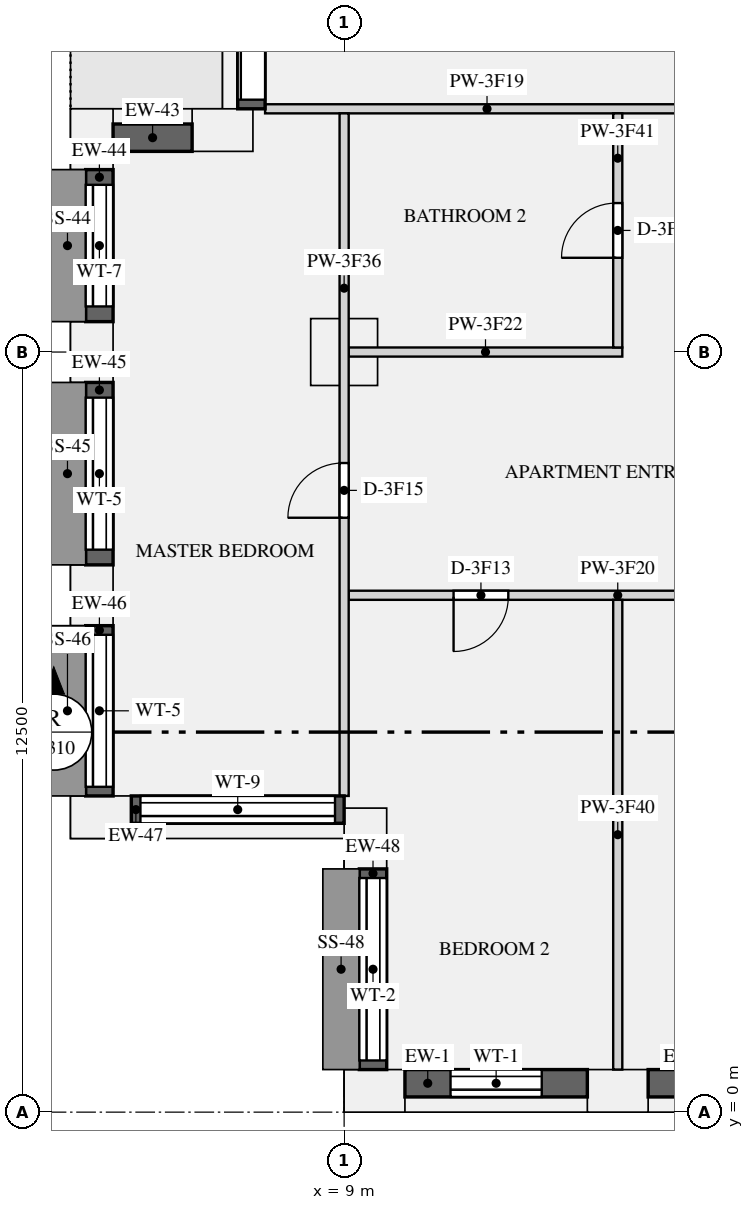
"""IFC4 building model, lengths in metres.
Left out: names, types, materials, properties, quantities, classifications, styles, units other than length and angle.
Written with IfcOpenShell. Run it as: python <this file> out.ifc"""

import sys

from ifc_helpers import new_model, si_unit, direction, frame, frame_2d, origin, origin_2d, place, context, subcontext, project, spatial, rectangle, extrude, element, fill, save


model = new_model("IFC4")
c1 = context("Model", 3, precision=1e-05, world=origin(), true_north=direction((0.0, 1.0)))
c2 = subcontext(c1, "Body", "Model", "MODEL_VIEW")
j1 = project(units=[si_unit("LENGTHUNIT", "METRE"), si_unit("PLANEANGLEUNIT", "RADIAN")], contexts=[c1])
p1 = place(None, origin())
s1 = spatial("IfcSite", under=j1, at=p1, CompositionType="ELEMENT")
p2 = place(p1, origin())
s2 = spatial("IfcBuilding", under=s1, at=p2, CompositionType="ELEMENT")
p3 = place(p2, frame((0.0, 0.0, 179.1)))
s3 = spatial("IfcBuildingStorey", under=s2, at=p3, CompositionType="ELEMENT", Elevation=179.1)
for number, where, z_axis, x_axis in (
    (1, (9.5, 0.35, 0.0), (0.0, 0.0, 1.0), (1.0, 0.0, 0.0)),
    (2, (13.5, 0.35, 0.0), (0.0, 0.0, 1.0), (1.0, 0.0, 0.0)),
    (3, (7.0, 16.15, 0.0), (0.0, 0.0, 1.0), (-1.0, 0.0, 0.0)),
    (4, (4.85, 16.0, 0.0), (0.0, 0.0, 1.0), (0.0, -1.0, 0.0)),
    (5, (4.85, 12.5, 0.0), (0.0, 0.0, 1.0), (0.0, -1.0, 0.0)),
    (6, (4.85, 8.5, 0.0), (0.0, 0.0, 1.0), (0.0, -1.0, 0.0)),
    (7, (5.0, 4.85, 0.0), (0.0, 0.0, 1.0), (1.0, 0.0, 0.0)),
    (8, (9.35, 4.5, 0.0), (0.0, 0.0, 1.0), (0.0, -1.0, 0.0)),
):
    element("IfcColumn", number, at=place(p3, frame(where, z_axis=z_axis, x_axis=x_axis)), inside=s3, PredefinedType="USERDEFINED", context=c2, shape_type="SweptSolid", body=[
        extrude(rectangle(XDim=1.0, YDim=0.7, at=origin_2d()), origin(), (0.0, 0.0, 1.0), 3.15),
    ])
p4 = place(p3, frame((9.0, 12.5, 0.0), z_axis=(0.0, 0.0, 1.0), x_axis=(1.0, 0.0, 0.0)))
e9 = element("IfcColumn", 9, at=p4, inside=s3, PredefinedType="COLUMN", context=c2, shape_type="SweptSolid", body=[
    extrude(rectangle(XDim=1.1, YDim=1.1, at=origin_2d()), origin(), (0.0, 0.0, 1.0), 3.15),
])
p5 = place(p3, frame((10.0, 0.475, 0.9), z_axis=(0.0, 0.0, 1.0), x_axis=(1.0, 0.0, 0.0)))
e10 = element("IfcWall", 10, at=p5, inside=s3, PredefinedType="SOLIDWALL", context=c2, shape_type="SweptSolid", body=[
    extrude(rectangle(XDim=3.0, YDim=0.45, at=frame_2d((1.5, 0.0))), origin(), (0.0, 0.0, 1.0), 1.93),
])
p6 = place(p5, frame((0.75, 0.0, 0.15)))
e11 = element("IfcOpeningElement", 11, at=p6, cuts=e10, PredefinedType="OPENING", context=c2, shape_type="SweptSolid", body=[
    extrude(rectangle(XDim=1.5, YDim=1.5, at=frame_2d((0.75, 0.75))), frame((0.0, 0.235, 0.0), z_axis=(0.0, -1.0, 0.0), x_axis=(1.0, 0.0, 0.0)), (0.0, 0.0, 1.0), 0.47),
])
p7 = place(p3, frame((14.0, 0.475, 0.9), z_axis=(0.0, 0.0, 1.0), x_axis=(1.0, 0.0, 0.0)))
e12 = element("IfcWall", 12, at=p7, inside=s3, PredefinedType="SOLIDWALL", context=c2, shape_type="SweptSolid", body=[
    extrude(rectangle(XDim=4.0, YDim=0.45, at=frame_2d((2.0, 0.0))), origin(), (0.0, 0.0, 1.0), 1.93),
])
p8 = place(p7, frame((1.25, 0.0, 0.15)))
e13 = element("IfcOpeningElement", 13, at=p8, cuts=e12, PredefinedType="OPENING", context=c2, shape_type="SweptSolid", body=[
    extrude(rectangle(XDim=1.5, YDim=1.5, at=frame_2d((0.75, 0.75))), frame((0.0, 0.235, 0.0), z_axis=(0.0, -1.0, 0.0), x_axis=(1.0, 0.0, 0.0)), (0.0, 0.0, 1.0), 0.47),
])
p9 = place(p3, frame((7.475, 20.0, 0.0), z_axis=(0.0, 0.0, 1.0), x_axis=(0.0, -1.0, 0.0)))
e14 = element("IfcWall", 14, at=p9, inside=s3, PredefinedType="SOLIDWALL", context=c2, shape_type="SweptSolid", body=[
    extrude(rectangle(XDim=3.5, YDim=0.45, at=frame_2d((1.75, 0.0))), origin(), (0.0, 0.0, 1.0), 2.83),
])
p10 = place(p9, frame((0.15, 0.0, 0.0)))
e15 = element("IfcOpeningElement", 15, at=p10, cuts=e14, PredefinedType="OPENING", context=c2, shape_type="SweptSolid", body=[
    extrude(rectangle(XDim=3.2, YDim=2.3, at=frame_2d((1.6, 1.15))), frame((0.0, 0.235, 0.0), z_axis=(0.0, -1.0, 0.0), x_axis=(1.0, 0.0, 0.0)), (0.0, 0.0, 1.0), 0.47),
])
p11 = place(p3, frame((6.5, 16.025, 0.9), z_axis=(0.0, 0.0, 1.0), x_axis=(-1.0, 0.0, 0.0)))
e16 = element("IfcWall", 16, at=p11, inside=s3, PredefinedType="SOLIDWALL", context=c2, shape_type="SweptSolid", body=[
    extrude(rectangle(XDim=1.3, YDim=0.45, at=frame_2d((0.65, 0.0))), origin(), (0.0, 0.0, 1.0), 1.93),
])
p12 = place(p3, frame((4.975, 15.5, 0.9), z_axis=(0.0, 0.0, 1.0), x_axis=(0.0, -1.0, 0.0)))
e17 = element("IfcWall", 17, at=p12, inside=s3, PredefinedType="SOLIDWALL", context=c2, shape_type="SweptSolid", body=[
    extrude(rectangle(XDim=2.5, YDim=0.45, at=frame_2d((1.25, 0.0))), origin(), (0.0, 0.0, 1.0), 1.93),
])
p13 = place(p12, frame((0.25, 0.0, 0.15)))
e18 = element("IfcOpeningElement", 18, at=p13, cuts=e17, PredefinedType="OPENING", context=c2, shape_type="SweptSolid", body=[
    extrude(rectangle(XDim=2.0, YDim=1.5, at=frame_2d((1.0, 0.75))), frame((0.0, 0.235, 0.0), z_axis=(0.0, -1.0, 0.0), x_axis=(1.0, 0.0, 0.0)), (0.0, 0.0, 1.0), 0.47),
])
p14 = place(p3, frame((4.975, 12.0, 0.9), z_axis=(0.0, 0.0, 1.0), x_axis=(0.0, -1.0, 0.0)))
e19 = element("IfcWall", 19, at=p14, inside=s3, PredefinedType="SOLIDWALL", context=c2, shape_type="SweptSolid", body=[
    extrude(rectangle(XDim=3.0, YDim=0.45, at=frame_2d((1.5, 0.0))), origin(), (0.0, 0.0, 1.0), 1.93),
])
p15 = place(p14, frame((0.25, 0.0, 0.15)))
e20 = element("IfcOpeningElement", 20, at=p15, cuts=e19, PredefinedType="OPENING", context=c2, shape_type="SweptSolid", body=[
    extrude(rectangle(XDim=2.5, YDim=1.5, at=frame_2d((1.25, 0.75))), frame((0.0, 0.235, 0.0), z_axis=(0.0, -1.0, 0.0), x_axis=(1.0, 0.0, 0.0)), (0.0, 0.0, 1.0), 0.47),
])
p16 = place(p3, frame((4.975, 8.0, 0.9), z_axis=(0.0, 0.0, 1.0), x_axis=(0.0, -1.0, 0.0)))
e21 = element("IfcWall", 21, at=p16, inside=s3, PredefinedType="SOLIDWALL", context=c2, shape_type="SweptSolid", body=[
    extrude(rectangle(XDim=2.8, YDim=0.45, at=frame_2d((1.4, 0.0))), origin(), (0.0, 0.0, 1.0), 1.93),
])
p17 = place(p16, frame((0.15, 0.0, 0.15)))
e22 = element("IfcOpeningElement", 22, at=p17, cuts=e21, PredefinedType="OPENING", context=c2, shape_type="SweptSolid", body=[
    extrude(rectangle(XDim=2.5, YDim=1.5, at=frame_2d((1.25, 0.75))), frame((0.0, 0.235, 0.0), z_axis=(0.0, -1.0, 0.0), x_axis=(1.0, 0.0, 0.0)), (0.0, 0.0, 1.0), 0.47),
])
p18 = place(p3, frame((5.5, 4.975, 0.9), z_axis=(0.0, 0.0, 1.0), x_axis=(1.0, 0.0, 0.0)))
e23 = element("IfcWall", 23, at=p18, inside=s3, PredefinedType="SOLIDWALL", context=c2, shape_type="SweptSolid", body=[
    extrude(rectangle(XDim=3.5, YDim=0.45, at=frame_2d((1.75, 0.0))), origin(), (0.0, 0.0, 1.0), 1.93),
])
p19 = place(p18, frame((0.15, 0.0, 0.15)))
e24 = element("IfcOpeningElement", 24, at=p19, cuts=e23, PredefinedType="OPENING", context=c2, shape_type="SweptSolid", body=[
    extrude(rectangle(XDim=3.2, YDim=1.5, at=frame_2d((1.6, 0.75))), frame((0.0, 0.235, 0.0), z_axis=(0.0, -1.0, 0.0), x_axis=(1.0, 0.0, 0.0)), (0.0, 0.0, 1.0), 0.47),
])
p20 = place(p3, frame((9.475, 4.0, 0.9), z_axis=(0.0, 0.0, 1.0), x_axis=(0.0, -1.0, 0.0)))
e25 = element("IfcWall", 25, at=p20, inside=s3, PredefinedType="SOLIDWALL", context=c2, shape_type="SweptSolid", body=[
    extrude(rectangle(XDim=3.3, YDim=0.45, at=frame_2d((1.65, 0.0))), origin(), (0.0, 0.0, 1.0), 1.93),
])
p21 = place(p20, frame((0.15, 0.0, 0.15)))
e26 = element("IfcOpeningElement", 26, at=p21, cuts=e25, PredefinedType="OPENING", context=c2, shape_type="SweptSolid", body=[
    extrude(rectangle(XDim=3.0, YDim=1.5, at=frame_2d((1.5, 0.75))), frame((0.0, 0.235, 0.0), z_axis=(0.0, -1.0, 0.0), x_axis=(1.0, 0.0, 0.0)), (0.0, 0.0, 1.0), 0.47),
])
p22 = place(p3, frame((7.7, 16.5, 0.0), z_axis=(0.0, 0.0, 1.0), x_axis=(1.0, 0.0, 0.0)))
e27 = element("IfcWall", 27, at=p22, inside=s3, PredefinedType="PARTITIONING", context=c2, shape_type="SweptSolid", body=[
    extrude(rectangle(XDim=10.2, YDim=0.15, at=frame_2d((5.1, 0.0))), origin(), (0.0, 0.0, 1.0), 2.83),
])
p23 = place(p22, frame((7.3, 0.0, 0.0)))
e28 = element("IfcOpeningElement", 28, at=p23, cuts=e27, PredefinedType="OPENING", context=c2, shape_type="SweptSolid", body=[
    extrude(rectangle(XDim=1.5, YDim=2.1, at=frame_2d((0.75, 1.05))), frame((0.0, 0.085, 0.0), z_axis=(0.0, -1.0, 0.0), x_axis=(1.0, 0.0, 0.0)), (0.0, 0.0, 1.0), 0.17),
])
p24 = place(p3, frame((9.075, 8.5, 0.0), z_axis=(0.0, 0.0, 1.0), x_axis=(1.0, 0.0, 0.0)))
e29 = element("IfcWall", 29, at=p24, inside=s3, PredefinedType="PARTITIONING", context=c2, shape_type="SweptSolid", body=[
    extrude(rectangle(XDim=8.925, YDim=0.15, at=frame_2d((4.462, 0.0))), origin(), (0.0, 0.0, 1.0), 2.83),
])
p25 = place(p24, frame((1.725, 0.0, 0.0)))
e30 = element("IfcOpeningElement", 30, at=p25, cuts=e29, PredefinedType="OPENING", context=c2, shape_type="SweptSolid", body=[
    extrude(rectangle(XDim=0.9, YDim=2.1, at=frame_2d((0.45, 1.05))), frame((0.0, 0.085, 0.0), z_axis=(0.0, -1.0, 0.0), x_axis=(1.0, 0.0, 0.0)), (0.0, 0.0, 1.0), 0.17),
])
p26 = place(p24, frame((6.225, 0.0, 0.0)))
e31 = element("IfcOpeningElement", 31, at=p26, cuts=e29, PredefinedType="OPENING", context=c2, shape_type="SweptSolid", body=[
    extrude(rectangle(XDim=0.9, YDim=2.1, at=frame_2d((0.45, 1.05))), frame((0.0, 0.085, 0.0), z_axis=(0.0, -1.0, 0.0), x_axis=(1.0, 0.0, 0.0)), (0.0, 0.0, 1.0), 0.17),
])
p27 = place(p3, frame((9.075, 12.5, 0.0), z_axis=(0.0, 0.0, 1.0), x_axis=(1.0, 0.0, 0.0)))
e32 = element("IfcWall", 32, at=p27, inside=s3, PredefinedType="PARTITIONING", context=c2, shape_type="SweptSolid", body=[
    extrude(rectangle(XDim=4.5, YDim=0.15, at=frame_2d((2.25, 0.0))), origin(), (0.0, 0.0, 1.0), 2.83),
])
p28 = place(p3, frame((9.0, 5.2, 0.0), z_axis=(0.0, 0.0, 1.0), x_axis=(0.0, 1.0, 0.0)))
e33 = element("IfcWall", 33, at=p28, inside=s3, PredefinedType="PARTITIONING", context=c2, shape_type="SweptSolid", body=[
    extrude(rectangle(XDim=11.225, YDim=0.15, at=frame_2d((5.613, 0.0))), origin(), (0.0, 0.0, 1.0), 2.83),
])
p29 = place(p28, frame((4.575, 0.0, 0.0)))
e34 = element("IfcOpeningElement", 34, at=p29, cuts=e33, PredefinedType="OPENING", context=c2, shape_type="SweptSolid", body=[
    extrude(rectangle(XDim=0.9, YDim=2.1, at=frame_2d((0.45, 1.05))), frame((0.0, 0.085, 0.0), z_axis=(0.0, -1.0, 0.0), x_axis=(1.0, 0.0, 0.0)), (0.0, 0.0, 1.0), 0.17),
])
p30 = place(p3, frame((13.5, 0.7, 0.0), z_axis=(0.0, 0.0, 1.0), x_axis=(0.0, 1.0, 0.0)))
e35 = element("IfcWall", 35, at=p30, inside=s3, PredefinedType="PARTITIONING", context=c2, shape_type="SweptSolid", body=[
    extrude(rectangle(XDim=7.725, YDim=0.15, at=frame_2d((3.863, 0.0))), origin(), (0.0, 0.0, 1.0), 2.83),
])
p31 = place(p3, frame((13.5, 12.575, 0.0), z_axis=(0.0, 0.0, 1.0), x_axis=(0.0, 1.0, 0.0)))
e36 = element("IfcWall", 36, at=p31, inside=s3, PredefinedType="PARTITIONING", context=c2, shape_type="SweptSolid", body=[
    extrude(rectangle(XDim=3.85, YDim=0.15, at=frame_2d((1.925, 0.0))), origin(), (0.0, 0.0, 1.0), 2.83),
])
p32 = place(p31, frame((1.475, 0.0, 0.0)))
e37 = element("IfcOpeningElement", 37, at=p32, cuts=e36, PredefinedType="OPENING", context=c2, shape_type="SweptSolid", body=[
    extrude(rectangle(XDim=0.9, YDim=2.1, at=frame_2d((0.45, 1.05))), frame((0.0, 0.085, 0.0), z_axis=(0.0, -1.0, 0.0), x_axis=(1.0, 0.0, 0.0)), (0.0, 0.0, 1.0), 0.17),
])
p33 = place(p6, origin())
e38 = element("IfcWindow", 38, at=p33, inside=s3, PartitioningType="SINGLE_PANEL", PredefinedType="WINDOW", context=c2, shape_type="SweptSolid", body=[
    extrude(rectangle(XDim=1.5, YDim=1.5, at=frame_2d((0.75, 0.75))), frame((0.0, -0.065, 0.0), z_axis=(0.0, -1.0, 0.0), x_axis=(1.0, 0.0, 0.0)), (0.0, 0.0, 1.0), 0.06),
])
fill(e11, e38)
p34 = place(p10, origin())
e39 = element("IfcDoor", 39, at=p34, inside=s3, OperationType="SLIDING_TO_LEFT", PredefinedType="DOOR", context=c2, shape_type="SweptSolid", body=[
    extrude(rectangle(XDim=3.2, YDim=2.3, at=frame_2d((1.6, 1.15))), frame((0.0, -0.07, 0.0), z_axis=(0.0, -1.0, 0.0), x_axis=(1.0, 0.0, 0.0)), (0.0, 0.0, 1.0), 0.05),
])
fill(e15, e39)
p35 = place(p13, origin())
e40 = element("IfcWindow", 40, at=p35, inside=s3, PartitioningType="SINGLE_PANEL", PredefinedType="WINDOW", context=c2, shape_type="SweptSolid", body=[
    extrude(rectangle(XDim=2.0, YDim=1.5, at=frame_2d((1.0, 0.75))), frame((0.0, -0.065, 0.0), z_axis=(0.0, -1.0, 0.0), x_axis=(1.0, 0.0, 0.0)), (0.0, 0.0, 1.0), 0.06),
])
fill(e18, e40)
p36 = place(p15, origin())
e41 = element("IfcWindow", 41, at=p36, inside=s3, PartitioningType="SINGLE_PANEL", PredefinedType="WINDOW", context=c2, shape_type="SweptSolid", body=[
    extrude(rectangle(XDim=2.5, YDim=1.5, at=frame_2d((1.25, 0.75))), frame((0.0, -0.065, 0.0), z_axis=(0.0, -1.0, 0.0), x_axis=(1.0, 0.0, 0.0)), (0.0, 0.0, 1.0), 0.06),
])
fill(e20, e41)
p37 = place(p17, origin())
e42 = element("IfcWindow", 42, at=p37, inside=s3, PartitioningType="SINGLE_PANEL", PredefinedType="WINDOW", context=c2, shape_type="SweptSolid", body=[
    extrude(rectangle(XDim=2.5, YDim=1.5, at=frame_2d((1.25, 0.75))), frame((0.0, -0.065, 0.0), z_axis=(0.0, -1.0, 0.0), x_axis=(1.0, 0.0, 0.0)), (0.0, 0.0, 1.0), 0.06),
])
fill(e22, e42)
p38 = place(p19, origin())
e43 = element("IfcWindow", 43, at=p38, inside=s3, PartitioningType="SINGLE_PANEL", PredefinedType="WINDOW", context=c2, shape_type="SweptSolid", body=[
    extrude(rectangle(XDim=3.2, YDim=1.5, at=frame_2d((1.6, 0.75))), frame((0.0, -0.065, 0.0), z_axis=(0.0, -1.0, 0.0), x_axis=(1.0, 0.0, 0.0)), (0.0, 0.0, 1.0), 0.06),
])
fill(e24, e43)
p39 = place(p21, origin())
e44 = element("IfcWindow", 44, at=p39, inside=s3, PartitioningType="SINGLE_PANEL", PredefinedType="WINDOW", context=c2, shape_type="SweptSolid", body=[
    extrude(rectangle(XDim=3.0, YDim=1.5, at=frame_2d((1.5, 0.75))), frame((0.0, -0.065, 0.0), z_axis=(0.0, -1.0, 0.0), x_axis=(1.0, 0.0, 0.0)), (0.0, 0.0, 1.0), 0.06),
])
fill(e26, e44)
p40 = place(p25, frame((0.9, 0.0, 0.0), z_axis=(0.0, 0.0, 1.0), x_axis=(-1.0, 0.0, 0.0)))
e45 = element("IfcDoor", 45, at=p40, inside=s3, OperationType="SINGLE_SWING_RIGHT", PredefinedType="DOOR", context=c2, shape_type="SweptSolid", body=[
    extrude(rectangle(XDim=0.9, YDim=2.1, at=frame_2d((0.45, 1.05))), frame((0.0, 0.025, 0.0), z_axis=(0.0, -1.0, 0.0), x_axis=(1.0, 0.0, 0.0)), (0.0, 0.0, 1.0), 0.05),
])
fill(e30, e45)
p41 = place(p29, origin())
e46 = element("IfcDoor", 46, at=p41, inside=s3, OperationType="SINGLE_SWING_LEFT", PredefinedType="DOOR", context=c2, shape_type="SweptSolid", body=[
    extrude(rectangle(XDim=0.9, YDim=2.1, at=frame_2d((0.45, 1.05))), frame((0.0, 0.025, 0.0), z_axis=(0.0, -1.0, 0.0), x_axis=(1.0, 0.0, 0.0)), (0.0, 0.0, 1.0), 0.05),
])
fill(e34, e46)
p42 = place(p32, origin())
e47 = element("IfcDoor", 47, at=p42, inside=s3, OperationType="SINGLE_SWING_LEFT", PredefinedType="DOOR", context=c2, shape_type="SweptSolid", body=[
    extrude(rectangle(XDim=0.9, YDim=2.1, at=frame_2d((0.45, 1.05))), frame((0.0, 0.025, 0.0), z_axis=(0.0, -1.0, 0.0), x_axis=(1.0, 0.0, 0.0)), (0.0, 0.0, 1.0), 0.05),
])
fill(e37, e47)
save(model, sys.argv[1])
